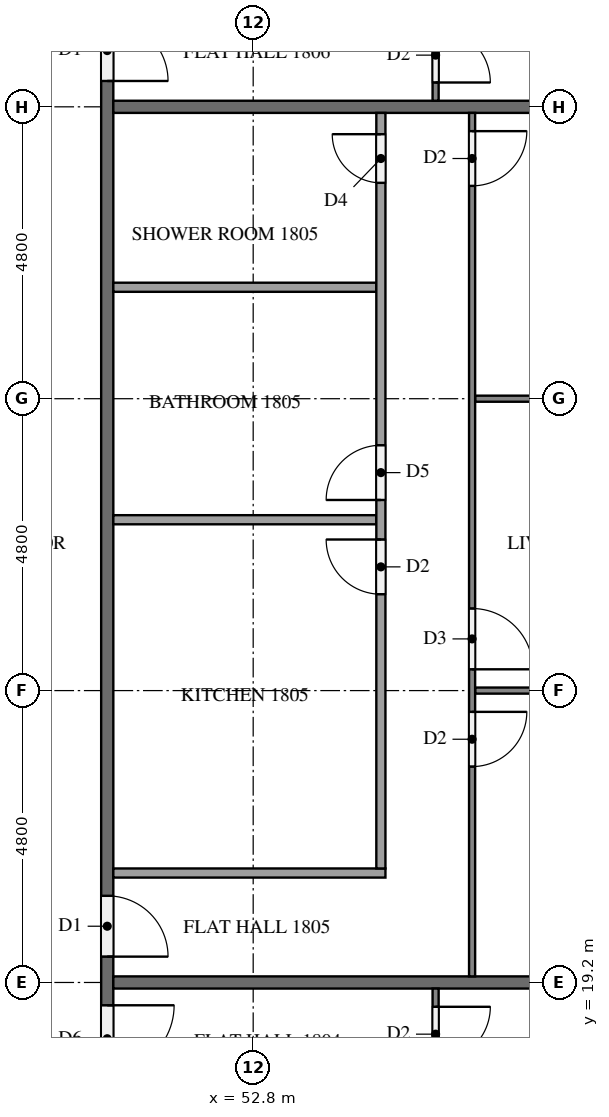
"""IFC4 building model, lengths in metres.
Left out: names, types, materials, properties, quantities, classifications, styles, units other than length and angle.
Written with IfcOpenShell. Run it as: python <this file> out.ifc"""

import sys

from ifc_helpers import new_model, si_unit, direction, frame, frame_2d, origin, place, context, subcontext, project, spatial, rectangle, extrude, element, fill, save


model = new_model("IFC4")
c1 = context("Model", 3, precision=1e-05, world=origin(), true_north=direction((0.0, 1.0)))
c2 = subcontext(c1, "Body", "Model", "MODEL_VIEW")
j1 = project(units=[si_unit("LENGTHUNIT", "METRE"), si_unit("PLANEANGLEUNIT", "RADIAN")], contexts=[c1])
p1 = place(None, origin())
s1 = spatial("IfcSite", under=j1, at=p1, CompositionType="ELEMENT")
p2 = place(p1, origin())
s2 = spatial("IfcBuilding", under=s1, at=p2, CompositionType="ELEMENT")
p3 = place(p2, frame((0.0, 0.0, 73.3)))
s3 = spatial("IfcBuildingStorey", under=s2, at=p3, CompositionType="ELEMENT", Elevation=73.3)
p4 = place(p3, frame((50.4, 40.7, 0.0), z_axis=(0.0, 0.0, 1.0), x_axis=(0.0, -1.0, 0.0)))
e1 = element("IfcWall", 1, at=p4, inside=s3, PredefinedType="PARTITIONING", context=c2, shape_type="SweptSolid", body=[
    extrude(rectangle(XDim=28.6, YDim=0.2, at=frame_2d((14.3, 0.0))), origin(), (0.0, 0.0, 1.0), 3.2),
])
p5 = place(p4, frame((21.875, 0.0, 0.0)))
e2 = element("IfcOpeningElement", 2, at=p5, cuts=e1, PredefinedType="OPENING", context=c2, shape_type="SweptSolid", body=[
    extrude(rectangle(XDim=1.1, YDim=2.1, at=frame_2d((0.55, 1.05))), frame((0.0, 0.11, 0.0), z_axis=(0.0, -1.0, 0.0), x_axis=(1.0, 0.0, 0.0)), (0.0, 0.0, 1.0), 0.22),
])
p6 = place(p4, frame((20.075, 0.0, 0.0)))
e3 = element("IfcOpeningElement", 3, at=p6, cuts=e1, PredefinedType="OPENING", context=c2, shape_type="SweptSolid", body=[
    extrude(rectangle(XDim=1.0, YDim=2.1, at=frame_2d((0.5, 1.05))), frame((0.0, 0.11, 0.0), z_axis=(0.0, -1.0, 0.0), x_axis=(1.0, 0.0, 0.0)), (0.0, 0.0, 1.0), 0.22),
])
p7 = place(p4, frame((5.675, 0.0, 0.0)))
e4 = element("IfcOpeningElement", 4, at=p7, cuts=e1, PredefinedType="OPENING", context=c2, shape_type="SweptSolid", body=[
    extrude(rectangle(XDim=1.0, YDim=2.1, at=frame_2d((0.5, 1.05))), frame((0.0, 0.11, 0.0), z_axis=(0.0, -1.0, 0.0), x_axis=(1.0, 0.0, 0.0)), (0.0, 0.0, 1.0), 0.22),
])
p8 = place(p3, frame((50.5, 19.2, 0.0), z_axis=(0.0, 0.0, 1.0), x_axis=(1.0, 0.0, 0.0)))
e5 = element("IfcWall", 5, at=p8, inside=s3, PredefinedType="PARTITIONING", context=c2, shape_type="SweptSolid", body=[
    extrude(rectangle(XDim=11.8, YDim=0.2, at=frame_2d((5.9, 0.0))), origin(), (0.0, 0.0, 1.0), 3.2),
])
p9 = place(p3, frame((50.5, 33.6, 0.0), z_axis=(0.0, 0.0, 1.0), x_axis=(1.0, 0.0, 0.0)))
e6 = element("IfcWall", 6, at=p9, inside=s3, PredefinedType="PARTITIONING", context=c2, shape_type="SweptSolid", body=[
    extrude(rectangle(XDim=11.475, YDim=0.2, at=frame_2d((5.738, 0.0))), origin(), (0.0, 0.0, 1.0), 3.2),
])
p10 = place(p3, frame((55.8, 19.1, 0.0), z_axis=(0.0, 0.0, 1.0), x_axis=(0.0, -1.0, 0.0)))
e7 = element("IfcWall", 7, at=p10, inside=s3, PredefinedType="PARTITIONING", context=c2, shape_type="SweptSolid", body=[
    extrude(rectangle(XDim=19.0, YDim=0.1, at=frame_2d((9.5, 0.0))), origin(), (0.0, 0.0, 1.0), 3.2),
])
p11 = place(p10, frame((0.3, 0.0, 0.0)))
e8 = element("IfcOpeningElement", 8, at=p11, cuts=e7, PredefinedType="OPENING", context=c2, shape_type="SweptSolid", body=[
    extrude(rectangle(XDim=0.9, YDim=2.1, at=frame_2d((0.45, 1.05))), frame((0.0, 0.06, 0.0), z_axis=(0.0, -1.0, 0.0), x_axis=(1.0, 0.0, 0.0)), (0.0, 0.0, 1.0), 0.12),
])
p12 = place(p10, frame((8.15, 0.0, 0.0)))
e9 = element("IfcOpeningElement", 9, at=p12, cuts=e7, PredefinedType="OPENING", context=c2, shape_type="SweptSolid", body=[
    extrude(rectangle(XDim=1.0, YDim=2.1, at=frame_2d((0.5, 1.05))), frame((0.0, 0.06, 0.0), z_axis=(0.0, -1.0, 0.0), x_axis=(1.0, 0.0, 0.0)), (0.0, 0.0, 1.0), 0.12),
])
p13 = place(p10, frame((9.85, 0.0, 0.0)))
e10 = element("IfcOpeningElement", 10, at=p13, cuts=e7, PredefinedType="OPENING", context=c2, shape_type="SweptSolid", body=[
    extrude(rectangle(XDim=0.9, YDim=2.1, at=frame_2d((0.45, 1.05))), frame((0.0, 0.06, 0.0), z_axis=(0.0, -1.0, 0.0), x_axis=(1.0, 0.0, 0.0)), (0.0, 0.0, 1.0), 0.12),
])
p14 = place(p10, frame((17.6, 0.0, 0.0)))
e11 = element("IfcOpeningElement", 11, at=p14, cuts=e7, PredefinedType="OPENING", context=c2, shape_type="SweptSolid", body=[
    extrude(rectangle(XDim=0.9, YDim=2.1, at=frame_2d((0.45, 1.05))), frame((0.0, 0.06, 0.0), z_axis=(0.0, -1.0, 0.0), x_axis=(1.0, 0.0, 0.0)), (0.0, 0.0, 1.0), 0.12),
])
p15 = place(p3, frame((56.45, 24.0, 0.0), z_axis=(0.0, 0.0, 1.0), x_axis=(1.0, 0.0, 0.0)))
e12 = element("IfcWall", 12, at=p15, inside=s3, PredefinedType="PARTITIONING", context=c2, shape_type="SweptSolid", body=[
    extrude(rectangle(XDim=5.525, YDim=0.1, at=frame_2d((2.763, 0.0))), origin(), (0.0, 0.0, 1.0), 3.2),
])
p16 = place(p3, frame((56.45, 28.8, 0.0), z_axis=(0.0, 0.0, 1.0), x_axis=(1.0, 0.0, 0.0)))
e13 = element("IfcWall", 13, at=p16, inside=s3, PredefinedType="PARTITIONING", context=c2, shape_type="SweptSolid", body=[
    extrude(rectangle(XDim=5.85, YDim=0.1, at=frame_2d((2.925, 0.0))), origin(), (0.0, 0.0, 1.0), 3.2),
])
p17 = place(p3, frame((56.4, 33.5, 0.0), z_axis=(0.0, 0.0, 1.0), x_axis=(0.0, -1.0, 0.0)))
e14 = element("IfcWall", 14, at=p17, inside=s3, PredefinedType="PARTITIONING", context=c2, shape_type="SweptSolid", body=[
    extrude(rectangle(XDim=14.2, YDim=0.1, at=frame_2d((7.1, 0.0))), origin(), (0.0, 0.0, 1.0), 3.2),
])
p18 = place(p17, frame((9.85, 0.0, 0.0)))
e15 = element("IfcOpeningElement", 15, at=p18, cuts=e14, PredefinedType="OPENING", context=c2, shape_type="SweptSolid", body=[
    extrude(rectangle(XDim=0.9, YDim=2.1, at=frame_2d((0.45, 1.05))), frame((0.0, 0.06, 0.0), z_axis=(0.0, -1.0, 0.0), x_axis=(1.0, 0.0, 0.0)), (0.0, 0.0, 1.0), 0.12),
])
p19 = place(p17, frame((8.15, 0.0, 0.0)))
e16 = element("IfcOpeningElement", 16, at=p19, cuts=e14, PredefinedType="OPENING", context=c2, shape_type="SweptSolid", body=[
    extrude(rectangle(XDim=1.0, YDim=2.1, at=frame_2d((0.5, 1.05))), frame((0.0, 0.06, 0.0), z_axis=(0.0, -1.0, 0.0), x_axis=(1.0, 0.0, 0.0)), (0.0, 0.0, 1.0), 0.12),
])
p20 = place(p17, frame((0.3, 0.0, 0.0)))
e17 = element("IfcOpeningElement", 17, at=p20, cuts=e14, PredefinedType="OPENING", context=c2, shape_type="SweptSolid", body=[
    extrude(rectangle(XDim=0.9, YDim=2.1, at=frame_2d((0.45, 1.05))), frame((0.0, 0.06, 0.0), z_axis=(0.0, -1.0, 0.0), x_axis=(1.0, 0.0, 0.0)), (0.0, 0.0, 1.0), 0.12),
])
for number, where, z_axis, x_axis in (
    (18, (50.5, 26.81, 0.0), (0.0, 0.0, 1.0), (1.0, 0.0, 0.0)),
    (19, (50.5, 30.633, 0.0), (0.0, 0.0, 1.0), (1.0, 0.0, 0.0)),
):
    element("IfcWall", number, at=place(p3, frame(where, z_axis=z_axis, x_axis=x_axis)), inside=s3, PredefinedType="PARTITIONING", context=c2, shape_type="SweptSolid", body=[
        extrude(rectangle(XDim=4.325, YDim=0.15, at=frame_2d((2.163, 0.0))), origin(), (0.0, 0.0, 1.0), 3.2),
    ])
p21 = place(p3, frame((50.5, 21.0, 0.0), z_axis=(0.0, 0.0, 1.0), x_axis=(1.0, 0.0, 0.0)))
e20 = element("IfcWall", 20, at=p21, inside=s3, PredefinedType="PARTITIONING", context=c2, shape_type="SweptSolid", body=[
    extrude(rectangle(XDim=4.475, YDim=0.15, at=frame_2d((2.238, 0.0))), origin(), (0.0, 0.0, 1.0), 3.2),
])
p22 = place(p3, frame((54.9, 21.075, 0.0), z_axis=(0.0, 0.0, 1.0), x_axis=(0.0, 1.0, 0.0)))
e21 = element("IfcWall", 21, at=p22, inside=s3, PredefinedType="PARTITIONING", context=c2, shape_type="SweptSolid", body=[
    extrude(rectangle(XDim=12.425, YDim=0.15, at=frame_2d((6.212, 0.0))), origin(), (0.0, 0.0, 1.0), 3.2),
])
p23 = place(p22, frame((4.51, 0.0, 0.0)))
e22 = element("IfcOpeningElement", 22, at=p23, cuts=e21, PredefinedType="OPENING", context=c2, shape_type="SweptSolid", body=[
    extrude(rectangle(XDim=0.9, YDim=2.1, at=frame_2d((0.45, 1.05))), frame((0.0, 0.085, 0.0), z_axis=(0.0, -1.0, 0.0), x_axis=(1.0, 0.0, 0.0)), (0.0, 0.0, 1.0), 0.17),
])
p24 = place(p22, frame((6.06, 0.0, 0.0)))
e23 = element("IfcOpeningElement", 23, at=p24, cuts=e21, PredefinedType="OPENING", context=c2, shape_type="SweptSolid", body=[
    extrude(rectangle(XDim=0.9, YDim=2.1, at=frame_2d((0.45, 1.05))), frame((0.0, 0.085, 0.0), z_axis=(0.0, -1.0, 0.0), x_axis=(1.0, 0.0, 0.0)), (0.0, 0.0, 1.0), 0.17),
])
p25 = place(p22, frame((11.275, 0.0, 0.0)))
e24 = element("IfcOpeningElement", 24, at=p25, cuts=e21, PredefinedType="OPENING", context=c2, shape_type="SweptSolid", body=[
    extrude(rectangle(XDim=0.8, YDim=2.1, at=frame_2d((0.4, 1.05))), frame((0.0, 0.085, 0.0), z_axis=(0.0, -1.0, 0.0), x_axis=(1.0, 0.0, 0.0)), (0.0, 0.0, 1.0), 0.17),
])
p26 = place(p3, frame((55.8, 47.9, 0.0), z_axis=(0.0, 0.0, 1.0), x_axis=(0.0, -1.0, 0.0)))
e25 = element("IfcWall", 25, at=p26, inside=s3, PredefinedType="PARTITIONING", context=c2, shape_type="SweptSolid", body=[
    extrude(rectangle(XDim=14.2, YDim=0.1, at=frame_2d((7.1, 0.0))), origin(), (0.0, 0.0, 1.0), 3.2),
])
p27 = place(p26, frame((13.0, 0.0, 0.0)))
e26 = element("IfcOpeningElement", 26, at=p27, cuts=e25, PredefinedType="OPENING", context=c2, shape_type="SweptSolid", body=[
    extrude(rectangle(XDim=0.9, YDim=2.1, at=frame_2d((0.45, 1.05))), frame((0.0, 0.06, 0.0), z_axis=(0.0, -1.0, 0.0), x_axis=(1.0, 0.0, 0.0)), (0.0, 0.0, 1.0), 0.12),
])
p28 = place(p26, frame((5.05, 0.0, 0.0)))
e27 = element("IfcOpeningElement", 27, at=p28, cuts=e25, PredefinedType="OPENING", context=c2, shape_type="SweptSolid", body=[
    extrude(rectangle(XDim=0.9, YDim=2.1, at=frame_2d((0.45, 1.05))), frame((0.0, 0.06, 0.0), z_axis=(0.0, -1.0, 0.0), x_axis=(1.0, 0.0, 0.0)), (0.0, 0.0, 1.0), 0.12),
])
p29 = place(p26, frame((3.35, 0.0, 0.0)))
e28 = element("IfcOpeningElement", 28, at=p29, cuts=e25, PredefinedType="OPENING", context=c2, shape_type="SweptSolid", body=[
    extrude(rectangle(XDim=1.0, YDim=2.1, at=frame_2d((0.5, 1.05))), frame((0.0, 0.06, 0.0), z_axis=(0.0, -1.0, 0.0), x_axis=(1.0, 0.0, 0.0)), (0.0, 0.0, 1.0), 0.12),
])
p30 = place(p5, origin())
e29 = element("IfcDoor", 29, at=p30, inside=s3, OperationType="SINGLE_SWING_LEFT", PredefinedType="DOOR", context=c2, shape_type="SweptSolid", body=[
    extrude(rectangle(XDim=1.1, YDim=2.1, at=frame_2d((0.55, 1.05))), frame((0.0, 0.025, 0.0), z_axis=(0.0, -1.0, 0.0), x_axis=(1.0, 0.0, 0.0)), (0.0, 0.0, 1.0), 0.05),
])
fill(e2, e29)
p31 = place(p6, origin())
e30 = element("IfcDoor", 30, at=p31, inside=s3, OperationType="SINGLE_SWING_RIGHT", PredefinedType="DOOR", context=c2, shape_type="SweptSolid", body=[
    extrude(rectangle(XDim=1.0, YDim=2.1, at=frame_2d((0.5, 1.05))), frame((0.0, 0.025, 0.0), z_axis=(0.0, -1.0, 0.0), x_axis=(1.0, 0.0, 0.0)), (0.0, 0.0, 1.0), 0.05),
])
fill(e3, e30)
p32 = place(p7, origin())
e31 = element("IfcDoor", 31, at=p32, inside=s3, OperationType="SINGLE_SWING_RIGHT", PredefinedType="DOOR", context=c2, shape_type="SweptSolid", body=[
    extrude(rectangle(XDim=1.0, YDim=2.1, at=frame_2d((0.5, 1.05))), frame((0.0, 0.025, 0.0), z_axis=(0.0, -1.0, 0.0), x_axis=(1.0, 0.0, 0.0)), (0.0, 0.0, 1.0), 0.05),
])
fill(e4, e31)
p33 = place(p11, origin())
e32 = element("IfcDoor", 32, at=p33, inside=s3, OperationType="SINGLE_SWING_LEFT", PredefinedType="DOOR", context=c2, shape_type="SweptSolid", body=[
    extrude(rectangle(XDim=0.9, YDim=2.1, at=frame_2d((0.45, 1.05))), frame((0.0, 0.025, 0.0), z_axis=(0.0, -1.0, 0.0), x_axis=(1.0, 0.0, 0.0)), (0.0, 0.0, 1.0), 0.05),
])
fill(e8, e32)
p34 = place(p18, origin())
e33 = element("IfcDoor", 33, at=p34, inside=s3, OperationType="SINGLE_SWING_LEFT", PredefinedType="DOOR", context=c2, shape_type="SweptSolid", body=[
    extrude(rectangle(XDim=0.9, YDim=2.1, at=frame_2d((0.45, 1.05))), frame((0.0, 0.025, 0.0), z_axis=(0.0, -1.0, 0.0), x_axis=(1.0, 0.0, 0.0)), (0.0, 0.0, 1.0), 0.05),
])
fill(e15, e33)
p35 = place(p19, origin())
e34 = element("IfcDoor", 34, at=p35, inside=s3, OperationType="SINGLE_SWING_RIGHT", PredefinedType="DOOR", context=c2, shape_type="SweptSolid", body=[
    extrude(rectangle(XDim=1.0, YDim=2.1, at=frame_2d((0.5, 1.05))), frame((0.0, 0.025, 0.0), z_axis=(0.0, -1.0, 0.0), x_axis=(1.0, 0.0, 0.0)), (0.0, 0.0, 1.0), 0.05),
])
fill(e16, e34)
p36 = place(p20, origin())
e35 = element("IfcDoor", 35, at=p36, inside=s3, OperationType="SINGLE_SWING_LEFT", PredefinedType="DOOR", context=c2, shape_type="SweptSolid", body=[
    extrude(rectangle(XDim=0.9, YDim=2.1, at=frame_2d((0.45, 1.05))), frame((0.0, 0.025, 0.0), z_axis=(0.0, -1.0, 0.0), x_axis=(1.0, 0.0, 0.0)), (0.0, 0.0, 1.0), 0.05),
])
fill(e17, e35)
p37 = place(p23, origin())
e36 = element("IfcDoor", 36, at=p37, inside=s3, OperationType="SINGLE_SWING_RIGHT", PredefinedType="DOOR", context=c2, shape_type="SweptSolid", body=[
    extrude(rectangle(XDim=0.9, YDim=2.1, at=frame_2d((0.45, 1.05))), frame((0.0, 0.025, 0.0), z_axis=(0.0, -1.0, 0.0), x_axis=(1.0, 0.0, 0.0)), (0.0, 0.0, 1.0), 0.05),
])
fill(e22, e36)
p38 = place(p24, origin())
e37 = element("IfcDoor", 37, at=p38, inside=s3, OperationType="SINGLE_SWING_LEFT", PredefinedType="DOOR", context=c2, shape_type="SweptSolid", body=[
    extrude(rectangle(XDim=0.9, YDim=2.1, at=frame_2d((0.45, 1.05))), frame((0.0, 0.025, 0.0), z_axis=(0.0, -1.0, 0.0), x_axis=(1.0, 0.0, 0.0)), (0.0, 0.0, 1.0), 0.05),
])
fill(e23, e37)
p39 = place(p25, origin())
e38 = element("IfcDoor", 38, at=p39, inside=s3, OperationType="SINGLE_SWING_RIGHT", PredefinedType="DOOR", context=c2, shape_type="SweptSolid", body=[
    extrude(rectangle(XDim=0.8, YDim=2.1, at=frame_2d((0.4, 1.05))), frame((0.0, 0.025, 0.0), z_axis=(0.0, -1.0, 0.0), x_axis=(1.0, 0.0, 0.0)), (0.0, 0.0, 1.0), 0.05),
])
fill(e24, e38)
p40 = place(p27, origin())
e39 = element("IfcDoor", 39, at=p40, inside=s3, OperationType="SINGLE_SWING_RIGHT", PredefinedType="DOOR", context=c2, shape_type="SweptSolid", body=[
    extrude(rectangle(XDim=0.9, YDim=2.1, at=frame_2d((0.45, 1.05))), frame((0.0, 0.025, 0.0), z_axis=(0.0, -1.0, 0.0), x_axis=(1.0, 0.0, 0.0)), (0.0, 0.0, 1.0), 0.05),
])
fill(e26, e39)
save(model, sys.argv[1])
